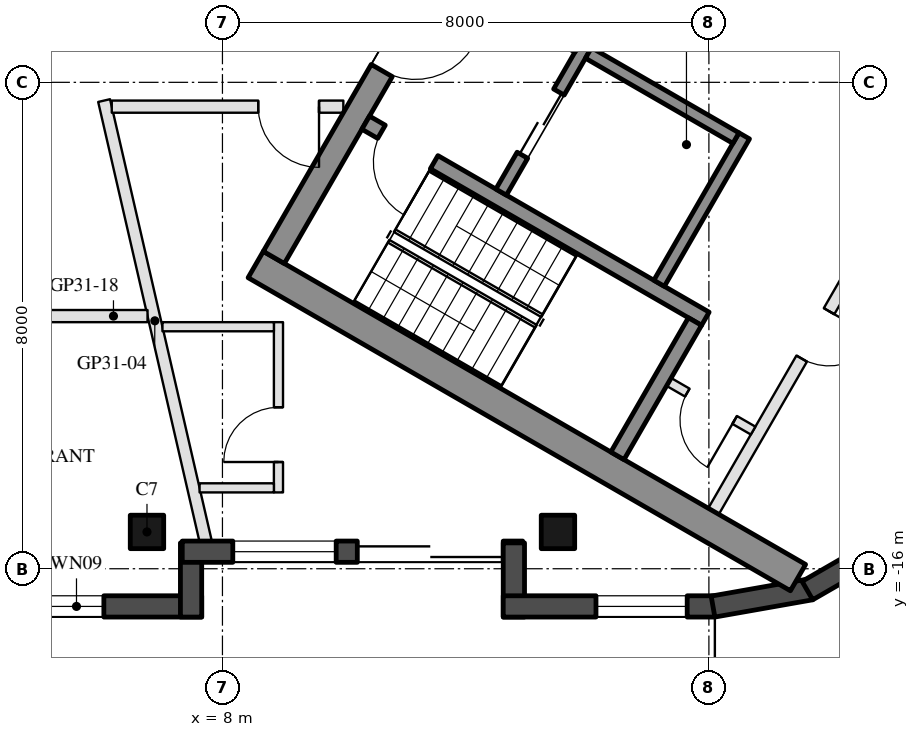
"""IFC4 building model, lengths in metres.
Left out: names, types, materials, properties, quantities, classifications, styles, units other than length and angle.
Written with IfcOpenShell. Run it as: python <this file> out.ifc"""

import sys

from ifc_helpers import new_model, si_unit, direction, frame, frame_2d, origin, origin_2d, place, context, subcontext, project, spatial, rectangle, hollow_rectangle, extrude, boolean, halfspace, element, fill, save


model = new_model("IFC4")
c1 = context("Model", 3, precision=1e-05, world=origin(), true_north=direction((0.0, 1.0)))
c2 = subcontext(c1, "Body", "Model", "MODEL_VIEW")
j1 = project(units=[si_unit("LENGTHUNIT", "METRE"), si_unit("PLANEANGLEUNIT", "RADIAN")], contexts=[c1])
p1 = place(None, origin())
s1 = spatial("IfcSite", under=j1, at=p1, CompositionType="ELEMENT")
p2 = place(p1, origin())
s2 = spatial("IfcBuilding", under=s1, at=p2, CompositionType="ELEMENT")
p3 = place(p2, frame((0.0, 0.0, 305.9)))
s3 = spatial("IfcBuildingStorey", under=s2, at=p3, CompositionType="ELEMENT", Elevation=305.9)
p4 = place(p3, frame((6.759, -15.395, 0.0), z_axis=(0.0, 0.0, 1.0), x_axis=(-1.0, 0.0, 0.0)))
e1 = element("IfcColumn", 1, at=p4, inside=s3, PredefinedType="COLUMN", context=c2, shape_type="SweptSolid", body=[
    boolean("DIFFERENCE", extrude(hollow_rectangle(XDim=0.55, YDim=0.55, WallThickness=0.025, at=origin_2d()), origin(), (0.0, 0.0, 1.0), 3.7), halfspace(frame((0.0, 0.0, 3.666), z_axis=(0.0, 0.0, 1.0), x_axis=(1.0, 0.0, 0.0)), False)),
])
p5 = place(p3, frame((13.518, -15.395, 0.0), z_axis=(0.0, 0.0, 1.0), x_axis=(-1.0, 0.0, 0.0)))
e2 = element("IfcColumn", 2, at=p5, inside=s3, PredefinedType="COLUMN", context=c2, shape_type="SweptSolid", body=[
    boolean("DIFFERENCE", extrude(hollow_rectangle(XDim=0.55, YDim=0.55, WallThickness=0.025, at=origin_2d()), origin(), (0.0, 0.0, 1.0), 3.7), halfspace(frame((0.0, 0.0, 3.66), z_axis=(0.0, 0.0, 1.0), x_axis=(1.0, 0.0, 0.0)), False)),
])
p6 = place(p3, frame((-0.9, -16.62, 0.0), z_axis=(0.0, 0.0, 1.0), x_axis=(1.0, 0.0, 0.0)))
e3 = element("IfcWall", 3, at=p6, inside=s3, PredefinedType="SOLIDWALL", context=c2, shape_type="SweptSolid", body=[
    extrude(rectangle(XDim=8.559, YDim=0.35, at=frame_2d((4.279, 0.0))), origin(), (0.0, 0.0, 1.0), 3.55),
])
p7 = place(p6, frame((1.525, 0.0, 0.3)))
e4 = element("IfcOpeningElement", 4, at=p7, cuts=e3, PredefinedType="OPENING", context=c2, shape_type="SweptSolid", body=[
    extrude(rectangle(XDim=0.9, YDim=2.65, at=frame_2d((0.45, 1.325))), frame((0.0, 0.185, 0.0), z_axis=(0.0, -1.0, 0.0), x_axis=(1.0, 0.0, 0.0)), (0.0, 0.0, 1.0), 0.37),
])
p8 = place(p6, frame((3.35, 0.0, 0.0)))
e5 = element("IfcOpeningElement", 5, at=p8, cuts=e3, PredefinedType="OPENING", context=c2, shape_type="SweptSolid", body=[
    extrude(rectangle(XDim=2.4, YDim=2.4, at=frame_2d((1.2, 1.2))), frame((0.0, 0.185, 0.0), z_axis=(0.0, -1.0, 0.0), x_axis=(1.0, 0.0, 0.0)), (0.0, 0.0, 1.0), 0.37),
])
p9 = place(p6, frame((6.05, 0.0, 0.3)))
e6 = element("IfcOpeningElement", 6, at=p9, cuts=e3, PredefinedType="OPENING", context=c2, shape_type="SweptSolid", body=[
    extrude(rectangle(XDim=0.9, YDim=2.65, at=frame_2d((0.45, 1.325))), frame((0.0, 0.185, 0.0), z_axis=(0.0, -1.0, 0.0), x_axis=(1.0, 0.0, 0.0)), (0.0, 0.0, 1.0), 0.37),
])
p10 = place(p3, frame((7.484, -16.795, 0.0), z_axis=(0.0, 0.0, 1.0), x_axis=(0.0, 1.0, 0.0)))
e7 = element("IfcWall", 7, at=p10, inside=s3, PredefinedType="SOLIDWALL", context=c2, shape_type="SweptSolid", body=[
    extrude(rectangle(XDim=1.22, YDim=0.35, at=frame_2d((0.61, 0.0))), origin(), (0.0, 0.0, 1.0), 3.55),
])
p11 = place(p3, frame((7.339, -15.719, 0.0), z_axis=(0.0, 0.0, 1.0), x_axis=(1.0, 0.0, 0.0)))
e8 = element("IfcWall", 8, at=p11, inside=s3, PredefinedType="SOLIDWALL", context=c2, shape_type="SweptSolid", body=[
    extrude(rectangle(XDim=5.599, YDim=0.35, at=frame_2d((2.799, 0.0))), origin(), (0.0, 0.0, 1.0), 3.55),
])
p12 = place(p11, frame((2.879, 0.0, 0.0)))
e9 = element("IfcOpeningElement", 9, at=p12, cuts=e8, PredefinedType="OPENING", context=c2, shape_type="SweptSolid", body=[
    extrude(rectangle(XDim=2.4, YDim=2.4, at=frame_2d((1.2, 1.2))), frame((0.0, 0.185, 0.0), z_axis=(0.0, -1.0, 0.0), x_axis=(1.0, 0.0, 0.0)), (0.0, 0.0, 1.0), 0.37),
])
p13 = place(p11, frame((0.831, 0.0, 0.3)))
e10 = element("IfcOpeningElement", 10, at=p13, cuts=e8, PredefinedType="OPENING", context=c2, shape_type="SweptSolid", body=[
    extrude(rectangle(XDim=1.7, YDim=2.65, at=frame_2d((0.85, 1.325))), frame((0.0, 0.185, 0.0), z_axis=(0.0, -1.0, 0.0), x_axis=(1.0, 0.0, 0.0)), (0.0, 0.0, 1.0), 0.37),
])
p14 = place(p3, frame((12.793, -15.575, 0.0), z_axis=(0.0, 0.0, 1.0), x_axis=(0.0, -1.0, 0.0)))
e11 = element("IfcWall", 11, at=p14, inside=s3, PredefinedType="SOLIDWALL", context=c2, shape_type="SweptSolid", body=[
    extrude(rectangle(XDim=1.22, YDim=0.35, at=frame_2d((0.61, 0.0))), origin(), (0.0, 0.0, 1.0), 3.55),
])
p15 = place(p3, frame((12.618, -16.62, 0.0), z_axis=(0.0, 0.0, 1.0), x_axis=(1.0, 0.0, 0.0)))
e12 = element("IfcWall", 12, at=p15, inside=s3, PredefinedType="SOLIDWALL", context=c2, shape_type="SweptSolid", body=[
    extrude(rectangle(XDim=3.48, YDim=0.35, at=frame_2d((1.74, 0.0))), origin(), (0.0, 0.0, 1.0), 3.55),
])
p16 = place(p15, frame((1.525, 0.0, 0.3)))
e13 = element("IfcOpeningElement", 13, at=p16, cuts=e12, PredefinedType="OPENING", context=c2, shape_type="SweptSolid", body=[
    extrude(rectangle(XDim=1.5, YDim=2.65, at=frame_2d((0.75, 1.325))), frame((0.0, 0.185, 0.0), z_axis=(0.0, -1.0, 0.0), x_axis=(1.0, 0.0, 0.0)), (0.0, 0.0, 1.0), 0.37),
])
p17 = place(p3, frame((16.068, -16.622, 0.0), z_axis=(0.0, 0.0, 1.0), x_axis=(0.98479107762, 0.173742721977, 0.0)))
e14 = element("IfcWall", 14, at=p17, inside=s3, PredefinedType="SOLIDWALL", context=c2, shape_type="SweptSolid", body=[
    extrude(rectangle(XDim=1.634, YDim=0.35, at=frame_2d((0.817, 0.0))), origin(), (0.0, 0.0, 1.0), 3.55),
])
p18 = place(p3, frame((17.62, -16.359, 0.0), z_axis=(0.0, 0.0, 1.0), x_axis=(0.866083589932, 0.499899205091, 0.0)))
e15 = element("IfcWall", 15, at=p18, inside=s3, PredefinedType="SOLIDWALL", context=c2, shape_type="SweptSolid", body=[
    extrude(rectangle(XDim=1.634, YDim=0.35, at=frame_2d((0.817, 0.0))), origin(), (0.0, 0.0, 1.0), 3.55),
])
p19 = place(p3, frame((8.547, -10.997, 0.0), z_axis=(0.0, 0.0, 1.0), x_axis=(0.866027279078, -0.499996751883, 0.0)))
e16 = element("IfcWall", 16, at=p19, inside=s3, PredefinedType="SHEAR", context=c2, shape_type="SweptSolid", body=[
    extrude(rectangle(XDim=10.298, YDim=0.5, at=frame_2d((5.149, 0.0))), origin(), (0.0, 0.0, 1.0), 3.5),
])
p20 = place(p3, frame((8.845, -10.88, 0.0), z_axis=(0.0, 0.0, 1.0), x_axis=(0.500004234368, 0.866022959057, 0.0)))
e17 = element("IfcWall", 17, at=p20, inside=s3, PredefinedType="SHEAR", context=c2, shape_type="SweptSolid", body=[
    extrude(rectangle(XDim=10.0, YDim=0.4, at=frame_2d((5.0, 0.0))), origin(), (0.0, 0.0, 1.0), 3.5),
])
p21 = place(p20, frame((3.55, 0.0, 0.0)))
e18 = element("IfcOpeningElement", 18, at=p21, cuts=e17, PredefinedType="OPENING", context=c2, shape_type="SweptSolid", body=[
    extrude(rectangle(XDim=1.1, YDim=2.1, at=frame_2d((0.55, 1.05))), frame((0.0, 0.21, 0.0), z_axis=(0.0, -1.0, 0.0), x_axis=(1.0, 0.0, 0.0)), (0.0, 0.0, 1.0), 0.42),
])
p22 = place(p20, frame((5.85, 0.0, 0.0)))
e19 = element("IfcOpeningElement", 19, at=p22, cuts=e17, PredefinedType="OPENING", context=c2, shape_type="SweptSolid", body=[
    extrude(rectangle(XDim=1.4, YDim=2.1, at=frame_2d((0.7, 1.05))), frame((0.0, 0.21, 0.0), z_axis=(0.0, -1.0, 0.0), x_axis=(1.0, 0.0, 0.0)), (0.0, 0.0, 1.0), 0.42),
])
p23 = place(p3, frame((10.356, -8.664, 0.0), z_axis=(0.0, 0.0, 1.0), x_axis=(0.866028629588, -0.499994412703, 0.0)))
e20 = element("IfcWall", 20, at=p23, inside=s3, PredefinedType="SHEAR", context=c2, shape_type="SweptSolid", body=[
    extrude(rectangle(XDim=6.45, YDim=0.25, at=frame_2d((3.225, 0.0))), origin(), (0.0, 0.0, 1.0), 3.5),
])
p24 = place(p23, frame((0.3, 0.0, 0.0)))
e21 = element("IfcOpeningElement", 21, at=p24, cuts=e20, PredefinedType="OPENING", context=c2, shape_type="SweptSolid", body=[
    extrude(rectangle(XDim=1.0, YDim=2.1, at=frame_2d((0.5, 1.05))), frame((0.0, 0.135, 0.0), z_axis=(0.0, -1.0, 0.0), x_axis=(1.0, 0.0, 0.0)), (0.0, 0.0, 1.0), 0.27),
])
p25 = place(p3, frame((14.496, -14.143, 0.0), z_axis=(0.0, 0.0, 1.0), x_axis=(0.500062241894, 0.865989465428, 0.0)))
e22 = element("IfcWall", 22, at=p25, inside=s3, PredefinedType="SHEAR", context=c2, shape_type="SweptSolid", body=[
    extrude(rectangle(XDim=2.55, YDim=0.25, at=frame_2d((1.275, 0.0))), origin(), (0.0, 0.0, 1.0), 3.5),
])
p26 = place(p3, frame((15.181, -11.305, 0.0), z_axis=(0.0, 0.0, 1.0), x_axis=(0.49994636267, 0.866056369097, 0.0)))
e23 = element("IfcWall", 23, at=p26, inside=s3, PredefinedType="SHEAR", context=c2, shape_type="SweptSolid", body=[
    extrude(rectangle(XDim=2.8, YDim=0.2, at=frame_2d((1.4, 0.0))), origin(), (0.0, 0.0, 1.0), 3.5),
])
p27 = place(p3, frame((12.583, -9.805, 0.0), z_axis=(0.0, 0.0, 1.0), x_axis=(0.49994636267, 0.866056369097, 0.0)))
e24 = element("IfcWall", 24, at=p27, inside=s3, PredefinedType="SHEAR", context=c2, shape_type="SweptSolid", body=[
    extrude(rectangle(XDim=2.8, YDim=0.2, at=frame_2d((1.4, 0.0))), origin(), (0.0, 0.0, 1.0), 3.5),
])
p28 = place(p27, frame((0.7, 0.0, 0.0)))
e25 = element("IfcOpeningElement", 25, at=p28, cuts=e24, PredefinedType="OPENING", context=c2, shape_type="SweptSolid", body=[
    extrude(rectangle(XDim=1.2, YDim=2.1, at=frame_2d((0.6, 1.05))), frame((0.0, 0.11, 0.0), z_axis=(0.0, -1.0, 0.0), x_axis=(1.0, 0.0, 0.0)), (0.0, 0.0, 1.0), 0.22),
])
p29 = place(p3, frame((11.768, -6.217, 0.0), z_axis=(0.0, 0.0, 1.0), x_axis=(0.866050077142, -0.499957262057, 0.0)))
e26 = element("IfcWall", 26, at=p29, inside=s3, PredefinedType="SHEAR", context=c2, shape_type="SweptSolid", body=[
    extrude(rectangle(XDim=2.4, YDim=0.2, at=frame_2d((1.2, 0.0))), origin(), (0.0, 0.0, 1.0), 3.5),
])
p30 = place(p3, frame((14.02, -7.517, 0.0), z_axis=(0.0, 0.0, 1.0), x_axis=(0.866034573852, -0.49998411664, 0.0)))
e27 = element("IfcWall", 27, at=p30, inside=s3, PredefinedType="SHEAR", context=c2, shape_type="SweptSolid", body=[
    extrude(rectangle(XDim=2.8, YDim=0.2, at=frame_2d((1.4, 0.0))), origin(), (0.0, 0.0, 1.0), 3.5),
])
p31 = place(p3, frame((12.968, -4.138, 0.0), z_axis=(0.0, 0.0, 1.0), x_axis=(0.866028328073, -0.49999493495, 0.0)))
e28 = element("IfcWall", 28, at=p31, inside=s3, PredefinedType="SHEAR", context=c2, shape_type="SweptSolid", body=[
    extrude(rectangle(XDim=10.16, YDim=0.2, at=frame_2d((5.08, 0.0))), origin(), (0.0, 0.0, 1.0), 3.5),
])
p32 = place(p31, frame((0.62, 0.0, 0.0)))
e29 = element("IfcOpeningElement", 29, at=p32, cuts=e28, PredefinedType="OPENING", context=c2, shape_type="SweptSolid", body=[
    extrude(rectangle(XDim=1.1, YDim=2.1, at=frame_2d((0.55, 1.05))), frame((0.0, 0.11, 0.0), z_axis=(0.0, -1.0, 0.0), x_axis=(1.0, 0.0, 0.0)), (0.0, 0.0, 1.0), 0.22),
])
p33 = place(p31, frame((5.8, 0.0, 0.0)))
e30 = element("IfcOpeningElement", 30, at=p33, cuts=e28, PredefinedType="OPENING", context=c2, shape_type="SweptSolid", body=[
    extrude(rectangle(XDim=0.9, YDim=2.1, at=frame_2d((0.45, 1.05))), frame((0.0, 0.11, 0.0), z_axis=(0.0, -1.0, 0.0), x_axis=(1.0, 0.0, 0.0)), (0.0, 0.0, 1.0), 0.22),
])
p34 = place(p3, frame((16.076, -15.055, 0.0), z_axis=(0.0, 0.0, 1.0), x_axis=(0.499995103361, 0.866028230842, 0.0)))
e31 = element("IfcWall", 31, at=p34, inside=s3, PredefinedType="PARTITIONING", context=c2, shape_type="SweptSolid", body=[
    extrude(rectangle(XDim=5.4, YDim=0.2, at=frame_2d((2.7, 0.0))), origin(), (0.0, 0.0, 1.0), 3.5),
])
p35 = place(p34, frame((2.9, 0.0, 0.0)))
e32 = element("IfcOpeningElement", 32, at=p35, cuts=e31, PredefinedType="OPENING", context=c2, shape_type="SweptSolid", body=[
    extrude(rectangle(XDim=0.9, YDim=2.1, at=frame_2d((0.45, 1.05))), frame((0.0, 0.11, 0.0), z_axis=(0.0, -1.0, 0.0), x_axis=(1.0, 0.0, 0.0)), (0.0, 0.0, 1.0), 0.22),
])
p36 = place(p3, frame((15.342, -12.928, 0.0), z_axis=(0.0, 0.0, 1.0), x_axis=(0.865989903783, -0.500061482766, 0.0)))
e33 = element("IfcWall", 33, at=p36, inside=s3, PredefinedType="PARTITIONING", context=c2, shape_type="SweptSolid", body=[
    extrude(rectangle(XDim=1.6, YDim=0.15, at=frame_2d((0.8, 0.0))), origin(), (0.0, 0.0, 1.0), 3.5),
])
p37 = place(p36, frame((0.35, 0.0, 0.0)))
e34 = element("IfcOpeningElement", 34, at=p37, cuts=e33, PredefinedType="OPENING", context=c2, shape_type="SweptSolid", body=[
    extrude(rectangle(XDim=0.9, YDim=2.1, at=frame_2d((0.45, 1.05))), frame((0.0, 0.085, 0.0), z_axis=(0.0, -1.0, 0.0), x_axis=(1.0, 0.0, 0.0)), (0.0, 0.0, 1.0), 0.17),
])
p38 = place(p3, frame((7.723, -15.545, 0.0), z_axis=(0.0, 0.0, 1.0), x_axis=(-0.224458954761, 0.974483544052, 0.0)))
e35 = element("IfcWall", 35, at=p38, inside=s3, PredefinedType="PARTITIONING", context=c2, shape_type="SweptSolid", body=[
    extrude(rectangle(XDim=7.434, YDim=0.2, at=frame_2d((3.717, 0.0))), origin(), (0.0, 0.0, 1.0), 3.1),
])
p39 = place(p3, frame((6.768, -11.844, 0.0), z_axis=(0.0, 0.0, 1.0), x_axis=(-1.0, 0.0, 0.0)))
e36 = element("IfcWall", 36, at=p39, inside=s3, PredefinedType="PARTITIONING", context=c2, shape_type="SweptSolid", body=[
    extrude(rectangle(XDim=4.668, YDim=0.2, at=frame_2d((2.334, 0.0))), origin(), (0.0, 0.0, 1.0), 3.1),
])
p40 = place(p39, frame((1.834, 0.0, 0.0)))
e37 = element("IfcOpeningElement", 37, at=p40, cuts=e36, PredefinedType="OPENING", context=c2, shape_type="SweptSolid", body=[
    extrude(rectangle(XDim=1.0, YDim=2.1, at=frame_2d((0.5, 1.05))), frame((0.0, 0.11, 0.0), z_axis=(0.0, -1.0, 0.0), x_axis=(1.0, 0.0, 0.0)), (0.0, 0.0, 1.0), 0.22),
])
p41 = place(p3, frame((9.988, -8.4, 0.0), z_axis=(0.0, 0.0, 1.0), x_axis=(-1.0, 0.0, 0.0)))
e38 = element("IfcWall", 38, at=p41, inside=s3, PredefinedType="PARTITIONING", context=c2, shape_type="SweptSolid", body=[
    extrude(rectangle(XDim=3.809, YDim=0.2, at=frame_2d((1.904, 0.0))), origin(), (0.0, 0.0, 1.0), 3.1),
])
p42 = place(p41, frame((0.4, 0.0, 0.0)))
e39 = element("IfcOpeningElement", 39, at=p42, cuts=e38, PredefinedType="OPENING", context=c2, shape_type="SweptSolid", body=[
    extrude(rectangle(XDim=1.0, YDim=2.1, at=frame_2d((0.5, 1.05))), frame((0.0, 0.11, 0.0), z_axis=(0.0, -1.0, 0.0), x_axis=(1.0, 0.0, 0.0)), (0.0, 0.0, 1.0), 0.22),
])
p43 = place(p3, frame((8.921, -14.745, 0.0), z_axis=(0.0, 0.0, 1.0), x_axis=(0.0, 1.0, 0.0)))
e40 = element("IfcWall", 40, at=p43, inside=s3, PredefinedType="PARTITIONING", context=c2, shape_type="SweptSolid", body=[
    extrude(rectangle(XDim=2.8, YDim=0.15, at=frame_2d((1.4, 0.0))), origin(), (0.0, 0.0, 1.0), 3.1),
])
p44 = place(p43, frame((0.5, 0.0, 0.0)))
e41 = element("IfcOpeningElement", 41, at=p44, cuts=e40, PredefinedType="OPENING", context=c2, shape_type="SweptSolid", body=[
    extrude(rectangle(XDim=0.9, YDim=2.1, at=frame_2d((0.45, 1.05))), frame((0.0, 0.085, 0.0), z_axis=(0.0, -1.0, 0.0), x_axis=(1.0, 0.0, 0.0)), (0.0, 0.0, 1.0), 0.17),
])
p45 = place(p3, frame((7.624, -14.67, 0.0), z_axis=(0.0, 0.0, 1.0), x_axis=(1.0, 0.0, 0.0)))
e42 = element("IfcWall", 42, at=p45, inside=s3, PredefinedType="PARTITIONING", context=c2, shape_type="SweptSolid", body=[
    extrude(rectangle(XDim=1.222, YDim=0.15, at=frame_2d((0.611, 0.0))), origin(), (0.0, 0.0, 1.0), 3.1),
])
p46 = place(p3, frame((7.013, -12.02, 0.0), z_axis=(0.0, 0.0, 1.0), x_axis=(1.0, 0.0, 0.0)))
e43 = element("IfcWall", 43, at=p46, inside=s3, PredefinedType="PARTITIONING", context=c2, shape_type="SweptSolid", body=[
    extrude(rectangle(XDim=1.833, YDim=0.15, at=frame_2d((0.917, 0.0))), origin(), (0.0, 0.0, 1.0), 3.55),
])
p47 = place(p9, origin())
e44 = element("IfcWindow", 44, at=p47, inside=s3, PartitioningType="SINGLE_PANEL", PredefinedType="WINDOW", context=c2, shape_type="SweptSolid", body=[
    extrude(rectangle(XDim=0.9, YDim=2.65, at=frame_2d((0.45, 1.325))), frame((0.0, 0.03, 0.0), z_axis=(0.0, -1.0, 0.0), x_axis=(1.0, 0.0, 0.0)), (0.0, 0.0, 1.0), 0.06),
])
fill(e6, e44)
p48 = place(p12, frame((2.4, 0.0, 0.0), z_axis=(0.0, 0.0, 1.0), x_axis=(-1.0, 0.0, 0.0)))
e45 = element("IfcDoor", 45, at=p48, inside=s3, OperationType="SLIDING_TO_LEFT", PredefinedType="DOOR", context=c2, shape_type="SweptSolid", body=[
    extrude(rectangle(XDim=2.4, YDim=2.4, at=frame_2d((1.2, 1.2))), frame((0.0, 0.025, 0.0), z_axis=(0.0, -1.0, 0.0), x_axis=(1.0, 0.0, 0.0)), (0.0, 0.0, 1.0), 0.05),
])
fill(e9, e45)
p49 = place(p13, origin())
e46 = element("IfcWindow", 46, at=p49, inside=s3, PartitioningType="SINGLE_PANEL", PredefinedType="WINDOW", context=c2, shape_type="SweptSolid", body=[
    extrude(rectangle(XDim=1.7, YDim=2.65, at=frame_2d((0.85, 1.325))), frame((0.0, 0.03, 0.0), z_axis=(0.0, -1.0, 0.0), x_axis=(1.0, 0.0, 0.0)), (0.0, 0.0, 1.0), 0.06),
])
fill(e10, e46)
p50 = place(p16, origin())
e47 = element("IfcWindow", 47, at=p50, inside=s3, PartitioningType="SINGLE_PANEL", PredefinedType="WINDOW", context=c2, shape_type="SweptSolid", body=[
    extrude(rectangle(XDim=1.5, YDim=2.65, at=frame_2d((0.75, 1.325))), frame((0.0, 0.03, 0.0), z_axis=(0.0, -1.0, 0.0), x_axis=(1.0, 0.0, 0.0)), (0.0, 0.0, 1.0), 0.06),
])
fill(e13, e47)
p51 = place(p28, origin())
e48 = element("IfcDoor", 48, at=p51, inside=s3, OperationType="DOUBLE_DOOR_SLIDING", PredefinedType="DOOR", context=c2, shape_type="SweptSolid", body=[
    extrude(rectangle(XDim=1.2, YDim=2.1, at=frame_2d((0.6, 1.05))), frame((0.0, 0.025, 0.0), z_axis=(0.0, -1.0, 0.0), x_axis=(1.0, 0.0, 0.0)), (0.0, 0.0, 1.0), 0.05),
])
fill(e25, e48)
p52 = place(p37, frame((0.9, 0.0, 0.0), z_axis=(0.0, 0.0, 1.0), x_axis=(-1.0, 0.0, 0.0)))
e49 = element("IfcDoor", 49, at=p52, inside=s3, OperationType="SINGLE_SWING_LEFT", PredefinedType="DOOR", context=c2, shape_type="SweptSolid", body=[
    extrude(rectangle(XDim=0.9, YDim=2.1, at=frame_2d((0.45, 1.05))), frame((0.0, 0.025, 0.0), z_axis=(0.0, -1.0, 0.0), x_axis=(1.0, 0.0, 0.0)), (0.0, 0.0, 1.0), 0.05),
])
fill(e34, e49)
p53 = place(p33, origin())
e50 = element("IfcDoor", 50, at=p53, inside=s3, OperationType="SINGLE_SWING_LEFT", PredefinedType="DOOR", context=c2, shape_type="SweptSolid", body=[
    extrude(rectangle(XDim=0.9, YDim=2.1, at=frame_2d((0.45, 1.05))), frame((0.0, 0.025, 0.0), z_axis=(0.0, -1.0, 0.0), x_axis=(1.0, 0.0, 0.0)), (0.0, 0.0, 1.0), 0.05),
])
fill(e30, e50)
p54 = place(p35, frame((0.9, 0.0, 0.0), z_axis=(0.0, 0.0, 1.0), x_axis=(-1.0, 0.0, 0.0)))
e51 = element("IfcDoor", 51, at=p54, inside=s3, OperationType="SINGLE_SWING_LEFT", PredefinedType="DOOR", context=c2, shape_type="SweptSolid", body=[
    extrude(rectangle(XDim=0.9, YDim=2.1, at=frame_2d((0.45, 1.05))), frame((0.0, 0.025, 0.0), z_axis=(0.0, -1.0, 0.0), x_axis=(1.0, 0.0, 0.0)), (0.0, 0.0, 1.0), 0.05),
])
fill(e32, e51)
p55 = place(p21, frame((1.1, 0.0, 0.0), z_axis=(0.0, 0.0, 1.0), x_axis=(-1.0, 0.0, 0.0)))
e52 = element("IfcDoor", 52, at=p55, inside=s3, OperationType="SINGLE_SWING_LEFT", PredefinedType="DOOR", context=c2, shape_type="SweptSolid", body=[
    extrude(rectangle(XDim=1.1, YDim=2.1, at=frame_2d((0.55, 1.05))), frame((0.0, 0.025, 0.0), z_axis=(0.0, -1.0, 0.0), x_axis=(1.0, 0.0, 0.0)), (0.0, 0.0, 1.0), 0.05),
])
fill(e18, e52)
p56 = place(p24, frame((1.0, 0.0, 0.0), z_axis=(0.0, 0.0, 1.0), x_axis=(-1.0, 0.0, 0.0)))
e53 = element("IfcDoor", 53, at=p56, inside=s3, OperationType="SINGLE_SWING_LEFT", PredefinedType="DOOR", context=c2, shape_type="SweptSolid", body=[
    extrude(rectangle(XDim=1.0, YDim=2.1, at=frame_2d((0.5, 1.05))), frame((0.0, 0.025, 0.0), z_axis=(0.0, -1.0, 0.0), x_axis=(1.0, 0.0, 0.0)), (0.0, 0.0, 1.0), 0.05),
])
fill(e21, e53)
p57 = place(p44, origin())
e54 = element("IfcDoor", 54, at=p57, inside=s3, OperationType="SINGLE_SWING_LEFT", PredefinedType="DOOR", context=c2, shape_type="SweptSolid", body=[
    extrude(rectangle(XDim=0.9, YDim=2.1, at=frame_2d((0.45, 1.05))), frame((0.0, 0.025, 0.0), z_axis=(0.0, -1.0, 0.0), x_axis=(1.0, 0.0, 0.0)), (0.0, 0.0, 1.0), 0.05),
])
fill(e41, e54)
p58 = place(p42, origin())
e55 = element("IfcDoor", 55, at=p58, inside=s3, OperationType="SINGLE_SWING_LEFT", PredefinedType="DOOR", context=c2, shape_type="SweptSolid", body=[
    extrude(rectangle(XDim=1.0, YDim=2.1, at=frame_2d((0.5, 1.05))), frame((0.0, 0.025, 0.0), z_axis=(0.0, -1.0, 0.0), x_axis=(1.0, 0.0, 0.0)), (0.0, 0.0, 1.0), 0.05),
])
fill(e39, e55)
save(model, sys.argv[1])
